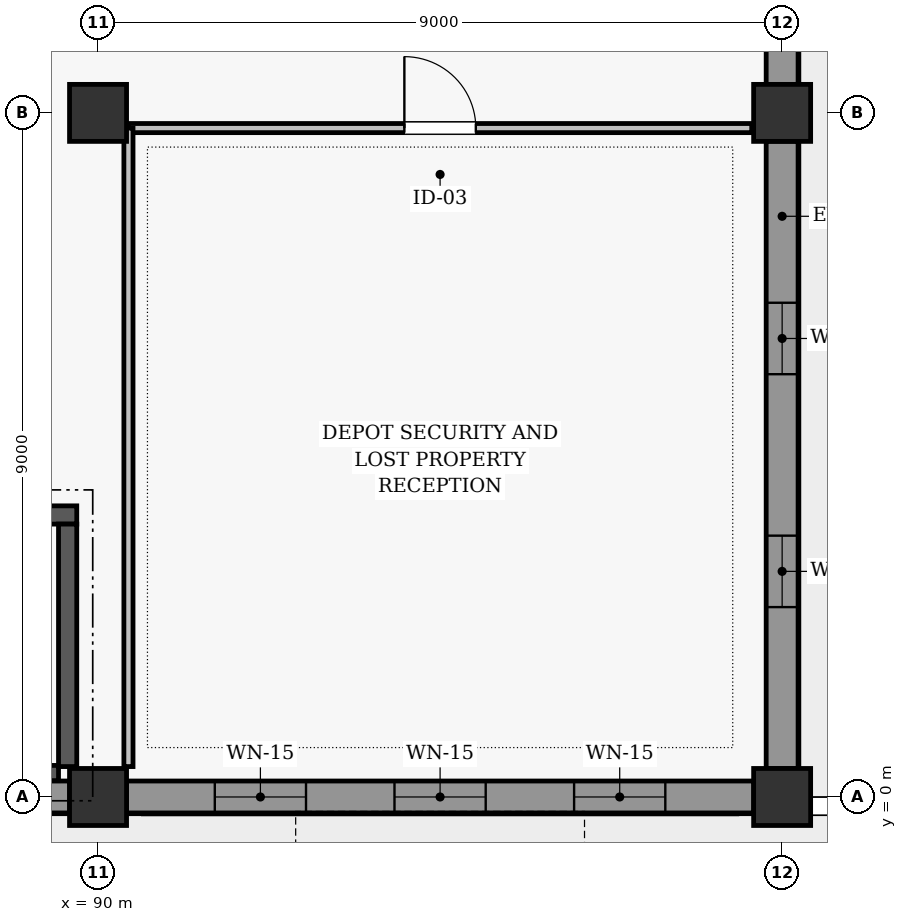
"""IFC4 building model, lengths in metres.
Left out: names, types, materials, properties, quantities, classifications, styles, units other than length and angle.
Written with IfcOpenShell. Run it as: python <this file> out.ifc"""

import sys

from ifc_helpers import new_model, si_unit, direction, frame, frame_2d, origin, origin_2d, place, context, subcontext, project, spatial, rectangle, extrude, element, fill, save


model = new_model("IFC4")
c1 = context("Model", 3, precision=1e-05, world=origin(), true_north=direction((0.0, 1.0)))
c2 = subcontext(c1, "Body", "Model", "MODEL_VIEW")
j1 = project(units=[si_unit("LENGTHUNIT", "METRE"), si_unit("PLANEANGLEUNIT", "RADIAN")], contexts=[c1])
p1 = place(None, origin())
s1 = spatial("IfcSite", under=j1, at=p1, CompositionType="ELEMENT")
p2 = place(p1, origin())
s2 = spatial("IfcBuilding", under=s1, at=p2, CompositionType="ELEMENT")
p3 = place(p2, origin())
s3 = spatial("IfcBuildingStorey", under=s2, at=p3, CompositionType="ELEMENT", Elevation=0.0)
for number, where, z_axis, x_axis in (
    (1, (90.0, 0.0, 0.0), (0.0, 0.0, 1.0), (1.0, 0.0, 0.0)),
    (2, (90.0, 9.0, 0.0), (0.0, 0.0, 1.0), (1.0, 0.0, 0.0)),
    (3, (99.0, 0.0, 0.0), (0.0, 0.0, 1.0), (1.0, 0.0, 0.0)),
    (4, (99.0, 9.0, 0.0), (0.0, 0.0, 1.0), (1.0, 0.0, 0.0)),
):
    element("IfcColumn", number, at=place(p3, frame(where, z_axis=z_axis, x_axis=x_axis)), inside=s3, PredefinedType="COLUMN", context=c2, shape_type="SweptSolid", body=[
        extrude(rectangle(XDim=0.75, YDim=0.75, at=origin_2d()), origin(), (0.0, 0.0, 1.0), 4.8),
    ])
p4 = place(p3, frame((81.373, 0.0, 0.0), z_axis=(0.0, 0.0, 1.0), x_axis=(1.0, 0.0, 0.0)))
e5 = element("IfcWall", 5, at=p4, inside=s3, PredefinedType="SOLIDWALL", context=c2, shape_type="SweptSolid", body=[
    extrude(rectangle(XDim=8.254, YDim=0.42, at=frame_2d((4.127, 0.0))), origin(), (0.0, 0.0, 1.0), 3.842),
])
p5 = place(p4, frame((0.377, 0.0, 0.0)))
e6 = element("IfcOpeningElement", 6, at=p5, cuts=e5, PredefinedType="OPENING", context=c2, shape_type="SweptSolid", body=[
    extrude(rectangle(XDim=1.06, YDim=2.1, at=frame_2d((0.53, 1.05))), frame((0.0, 0.22, 0.0), z_axis=(0.0, -1.0, 0.0), x_axis=(1.0, 0.0, 0.0)), (0.0, 0.0, 1.0), 0.44),
])
p6 = place(p3, frame((90.373, 0.0, 0.0), z_axis=(0.0, 0.0, 1.0), x_axis=(1.0, 0.0, 0.0)))
e7 = element("IfcWall", 7, at=p6, inside=s3, PredefinedType="SOLIDWALL", context=c2, shape_type="SweptSolid", body=[
    extrude(rectangle(XDim=8.254, YDim=0.42, at=frame_2d((4.127, 0.0))), origin(), (0.0, 0.0, 1.0), 3.842),
])
p7 = place(p6, frame((1.163, 0.0, 0.8)))
e8 = element("IfcOpeningElement", 8, at=p7, cuts=e7, PredefinedType="OPENING", context=c2, shape_type="SweptSolid", body=[
    extrude(rectangle(XDim=1.2, YDim=2.2, at=frame_2d((0.6, 1.1))), frame((0.0, 0.22, 0.0), z_axis=(0.0, -1.0, 0.0), x_axis=(1.0, 0.0, 0.0)), (0.0, 0.0, 1.0), 0.44),
])
p8 = place(p6, frame((3.527, 0.0, 0.8)))
e9 = element("IfcOpeningElement", 9, at=p8, cuts=e7, PredefinedType="OPENING", context=c2, shape_type="SweptSolid", body=[
    extrude(rectangle(XDim=1.2, YDim=2.2, at=frame_2d((0.6, 1.1))), frame((0.0, 0.22, 0.0), z_axis=(0.0, -1.0, 0.0), x_axis=(1.0, 0.0, 0.0)), (0.0, 0.0, 1.0), 0.44),
])
p9 = place(p6, frame((5.89, 0.0, 0.8)))
e10 = element("IfcOpeningElement", 10, at=p9, cuts=e7, PredefinedType="OPENING", context=c2, shape_type="SweptSolid", body=[
    extrude(rectangle(XDim=1.2, YDim=2.2, at=frame_2d((0.6, 1.1))), frame((0.0, 0.22, 0.0), z_axis=(0.0, -1.0, 0.0), x_axis=(1.0, 0.0, 0.0)), (0.0, 0.0, 1.0), 0.44),
])
p10 = place(p3, frame((99.0, 0.373, 0.0), z_axis=(0.0, 0.0, 1.0), x_axis=(0.0, 1.0, 0.0)))
e11 = element("IfcWall", 11, at=p10, inside=s3, PredefinedType="SOLIDWALL", context=c2, shape_type="SweptSolid", body=[
    extrude(rectangle(XDim=8.254, YDim=0.42, at=frame_2d((4.127, 0.0))), origin(), (0.0, 0.0, 1.0), 4.042),
])
p11 = place(p10, frame((2.125, 0.0, 0.85)))
e12 = element("IfcOpeningElement", 12, at=p11, cuts=e11, PredefinedType="OPENING", context=c2, shape_type="SweptSolid", body=[
    extrude(rectangle(XDim=0.94, YDim=1.28, at=frame_2d((0.47, 0.64))), frame((0.0, 0.22, 0.0), z_axis=(0.0, -1.0, 0.0), x_axis=(1.0, 0.0, 0.0)), (0.0, 0.0, 1.0), 0.44),
])
p12 = place(p10, frame((5.189, 0.0, 0.85)))
e13 = element("IfcOpeningElement", 13, at=p12, cuts=e11, PredefinedType="OPENING", context=c2, shape_type="SweptSolid", body=[
    extrude(rectangle(XDim=0.94, YDim=1.28, at=frame_2d((0.47, 0.64))), frame((0.0, 0.22, 0.0), z_axis=(0.0, -1.0, 0.0), x_axis=(1.0, 0.0, 0.0)), (0.0, 0.0, 1.0), 0.44),
])
p13 = place(p3, frame((99.0, 9.373, 0.0), z_axis=(0.0, 0.0, 1.0), x_axis=(0.0, 1.0, 0.0)))
e14 = element("IfcWall", 14, at=p13, inside=s3, PredefinedType="SOLIDWALL", context=c2, shape_type="SweptSolid", body=[
    extrude(rectangle(XDim=8.254, YDim=0.42, at=frame_2d((4.127, 0.0))), origin(), (0.0, 0.0, 1.0), 4.042),
])
p14 = place(p13, frame((3.302, 0.0, 0.0)))
e15 = element("IfcOpeningElement", 15, at=p14, cuts=e14, PredefinedType="OPENING", context=c2, shape_type="SweptSolid", body=[
    extrude(rectangle(XDim=1.65, YDim=2.28, at=frame_2d((0.825, 1.14))), frame((0.0, 0.22, 0.0), z_axis=(0.0, -1.0, 0.0), x_axis=(1.0, 0.0, 0.0)), (0.0, 0.0, 1.0), 0.44),
])
p15 = place(p3, frame((83.04, 0.315, 0.0), z_axis=(0.0, 0.0, 1.0), x_axis=(1.0, 0.0, 0.0)))
e16 = element("IfcWall", 16, at=p15, inside=s3, PredefinedType="SHEAR", context=c2, shape_type="SweptSolid", body=[
    extrude(rectangle(XDim=6.44, YDim=0.2, at=frame_2d((3.22, 0.0))), origin(), (0.0, 0.0, 1.0), 4.55),
])
p16 = place(p3, frame((81.28, 3.71, 0.0), z_axis=(0.0, 0.0, 1.0), x_axis=(1.0, 0.0, 0.0)))
e17 = element("IfcWall", 17, at=p16, inside=s3, PredefinedType="SHEAR", context=c2, shape_type="SweptSolid", body=[
    extrude(rectangle(XDim=8.44, YDim=0.24, at=frame_2d((4.22, 0.0))), origin(), (0.0, 0.0, 1.0), 4.55),
])
p17 = place(p16, frame((0.46, 0.0, 0.0)))
e18 = element("IfcOpeningElement", 18, at=p17, cuts=e17, PredefinedType="OPENING", context=c2, shape_type="SweptSolid", body=[
    extrude(rectangle(XDim=1.08, YDim=2.08, at=frame_2d((0.54, 1.04))), frame((0.0, 0.13, 0.0), z_axis=(0.0, -1.0, 0.0), x_axis=(1.0, 0.0, 0.0)), (0.0, 0.0, 1.0), 0.26),
])
p18 = place(p3, frame((89.6, 0.4, 0.0), z_axis=(0.0, 0.0, 1.0), x_axis=(0.0, 1.0, 0.0)))
e19 = element("IfcWall", 19, at=p18, inside=s3, PredefinedType="SHEAR", context=c2, shape_type="SweptSolid", body=[
    extrude(rectangle(XDim=3.19, YDim=0.24, at=frame_2d((1.595, 0.0))), origin(), (0.0, 0.0, 1.0), 4.55),
])
p19 = place(p3, frame((90.4, 8.8, 0.0), z_axis=(0.0, 0.0, 1.0), x_axis=(1.0, 0.0, 0.0)))
e20 = element("IfcWall", 20, at=p19, inside=s3, PredefinedType="PARTITIONING", context=c2, shape_type="SweptSolid", body=[
    extrude(rectangle(XDim=8.2, YDim=0.12, at=frame_2d((4.1, 0.0))), origin(), (0.0, 0.0, 1.0), 3.795),
])
p20 = place(p19, frame((3.63, 0.0, 0.0)))
e21 = element("IfcOpeningElement", 21, at=p20, cuts=e20, PredefinedType="OPENING", context=c2, shape_type="SweptSolid", body=[
    extrude(rectangle(XDim=0.94, YDim=2.06, at=frame_2d((0.47, 1.03))), frame((0.0, 0.07, 0.0), z_axis=(0.0, -1.0, 0.0), x_axis=(1.0, 0.0, 0.0)), (0.0, 0.0, 1.0), 0.14),
])
p21 = place(p3, frame((90.4, 0.4, 0.0), z_axis=(0.0, 0.0, 1.0), x_axis=(0.0, 1.0, 0.0)))
e22 = element("IfcWall", 22, at=p21, inside=s3, PredefinedType="PARTITIONING", context=c2, shape_type="SweptSolid", body=[
    extrude(rectangle(XDim=8.4, YDim=0.12, at=frame_2d((4.2, 0.0))), origin(), (0.0, 0.0, 1.0), 3.795),
])
p22 = place(p7, origin())
e23 = element("IfcWindow", 23, at=p22, inside=s3, PartitioningType="SINGLE_PANEL", PredefinedType="WINDOW", context=c2, shape_type="SweptSolid", body=[
    extrude(rectangle(XDim=1.2, YDim=2.2, at=frame_2d((0.6, 1.1))), frame((0.0, 0.03, 0.0), z_axis=(0.0, -1.0, 0.0), x_axis=(1.0, 0.0, 0.0)), (0.0, 0.0, 1.0), 0.06),
])
fill(e8, e23)
p23 = place(p8, origin())
e24 = element("IfcWindow", 24, at=p23, inside=s3, PartitioningType="SINGLE_PANEL", PredefinedType="WINDOW", context=c2, shape_type="SweptSolid", body=[
    extrude(rectangle(XDim=1.2, YDim=2.2, at=frame_2d((0.6, 1.1))), frame((0.0, 0.03, 0.0), z_axis=(0.0, -1.0, 0.0), x_axis=(1.0, 0.0, 0.0)), (0.0, 0.0, 1.0), 0.06),
])
fill(e9, e24)
p24 = place(p9, origin())
e25 = element("IfcWindow", 25, at=p24, inside=s3, PartitioningType="SINGLE_PANEL", PredefinedType="WINDOW", context=c2, shape_type="SweptSolid", body=[
    extrude(rectangle(XDim=1.2, YDim=2.2, at=frame_2d((0.6, 1.1))), frame((0.0, 0.03, 0.0), z_axis=(0.0, -1.0, 0.0), x_axis=(1.0, 0.0, 0.0)), (0.0, 0.0, 1.0), 0.06),
])
fill(e10, e25)
p25 = place(p11, origin())
e26 = element("IfcWindow", 26, at=p25, inside=s3, PartitioningType="SINGLE_PANEL", PredefinedType="WINDOW", context=c2, shape_type="SweptSolid", body=[
    extrude(rectangle(XDim=0.94, YDim=1.28, at=frame_2d((0.47, 0.64))), frame((0.0, 0.03, 0.0), z_axis=(0.0, -1.0, 0.0), x_axis=(1.0, 0.0, 0.0)), (0.0, 0.0, 1.0), 0.06),
])
fill(e12, e26)
p26 = place(p12, origin())
e27 = element("IfcWindow", 27, at=p26, inside=s3, PartitioningType="SINGLE_PANEL", PredefinedType="WINDOW", context=c2, shape_type="SweptSolid", body=[
    extrude(rectangle(XDim=0.94, YDim=1.28, at=frame_2d((0.47, 0.64))), frame((0.0, 0.03, 0.0), z_axis=(0.0, -1.0, 0.0), x_axis=(1.0, 0.0, 0.0)), (0.0, 0.0, 1.0), 0.06),
])
fill(e13, e27)
p27 = place(p20, origin())
e28 = element("IfcDoor", 28, at=p27, inside=s3, OperationType="SINGLE_SWING_LEFT", PredefinedType="DOOR", context=c2, shape_type="SweptSolid", body=[
    extrude(rectangle(XDim=0.94, YDim=2.06, at=frame_2d((0.47, 1.03))), frame((0.0, 0.025, 0.0), z_axis=(0.0, -1.0, 0.0), x_axis=(1.0, 0.0, 0.0)), (0.0, 0.0, 1.0), 0.05),
])
fill(e21, e28)
save(model, sys.argv[1])
